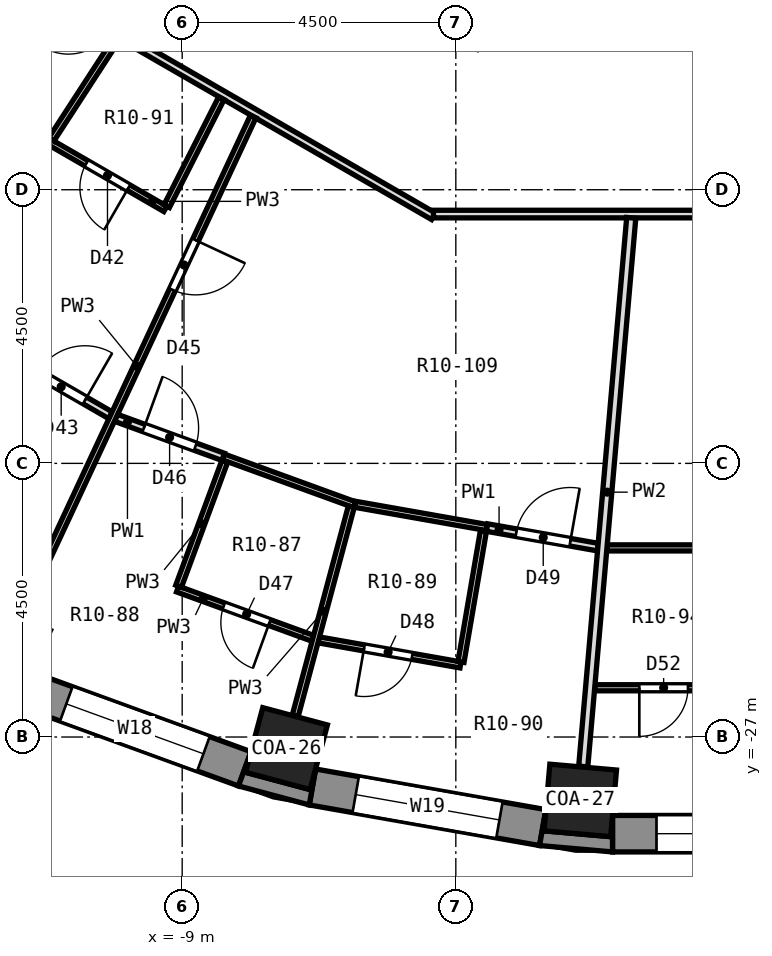
"""IFC4 building model, lengths in metres.
Left out: names, types, materials, properties, quantities, classifications, styles, units other than length and angle.
Written with IfcOpenShell. Run it as: python <this file> out.ifc"""

import sys

from ifc_helpers import new_model, si_unit, direction, frame, frame_2d, origin, origin_2d, place, context, subcontext, project, spatial, polyline, rectangle, outline, extrude, element, fill, save


model = new_model("IFC4")
c1 = context("Model", 3, precision=1e-05, world=origin(), true_north=direction((0.0, 1.0)))
c2 = subcontext(c1, "Body", "Model", "MODEL_VIEW")
j1 = project(units=[si_unit("LENGTHUNIT", "METRE"), si_unit("PLANEANGLEUNIT", "RADIAN")], contexts=[c1])
p1 = place(None, origin())
s1 = spatial("IfcSite", under=j1, at=p1, CompositionType="ELEMENT")
p2 = place(p1, origin())
s2 = spatial("IfcBuilding", under=s1, at=p2, CompositionType="ELEMENT")
p3 = place(p2, frame((0.0, 0.0, 36.2)))
s3 = spatial("IfcBuildingStorey", under=s2, at=p3, CompositionType="ELEMENT", Elevation=36.2)
for number, where, z_axis, x_axis in (
    (1, (-7.286, -27.191, 0.0), (0.0, 0.0, 1.0), (-0.259, -0.966, 0.0)),
    (2, (-2.453, -28.043, 0.0), (0.0, 0.0, 1.0), (-0.087, -0.996, 0.0)),
):
    element("IfcColumn", number, at=place(p3, frame(where, z_axis=z_axis, x_axis=x_axis)), inside=s3, PredefinedType="COLUMN", context=c2, shape_type="SweptSolid", body=[
        extrude(rectangle(XDim=1.1, YDim=1.1, at=origin_2d()), origin(), (0.0, 0.0, 1.0), 3.3),
    ])
p4 = place(p3, frame((-11.585, -26.208, 0.0), z_axis=(0.0, 0.0, 1.0), x_axis=(0.939689588564, -0.342028474173, 0.0)))
e3 = element("IfcWall", 3, at=p4, inside=s3, PredefinedType="SOLIDWALL", context=c2, shape_type="SweptSolid", body=[
    extrude(rectangle(XDim=3.846, YDim=0.6, at=frame_2d((1.923, 0.0))), origin(), (0.0, 0.0, 1.0), 2.75),
])
p5 = place(p4, frame((0.723, 0.0, 0.9)))
e4 = element("IfcOpeningElement", 4, at=p5, cuts=e3, PredefinedType="OPENING", context=c2, shape_type="SweptSolid", body=[
    extrude(rectangle(XDim=2.4, YDim=1.8, at=frame_2d((1.2, 0.9))), frame((0.0, 0.312, 0.0), z_axis=(0.0, -1.0, 0.0), x_axis=(1.0, 0.0, 0.0)), (0.0, 0.0, 1.0), 0.624),
])
p6 = place(p3, frame((-6.858, -27.821, 0.0), z_axis=(0.0, 0.0, 1.0), x_axis=(0.984800809218, -0.173687553279, 0.0)))
e5 = element("IfcWall", 5, at=p6, inside=s3, PredefinedType="SOLIDWALL", context=c2, shape_type="SweptSolid", body=[
    extrude(rectangle(XDim=3.846, YDim=0.6, at=frame_2d((1.923, 0.0))), origin(), (0.0, 0.0, 1.0), 2.75),
])
p7 = place(p6, frame((0.723, 0.0, 0.9)))
e6 = element("IfcOpeningElement", 6, at=p7, cuts=e5, PredefinedType="OPENING", context=c2, shape_type="SweptSolid", body=[
    extrude(rectangle(XDim=2.4, YDim=1.8, at=frame_2d((1.2, 0.9))), frame((0.0, 0.312, 0.0), z_axis=(0.0, -1.0, 0.0), x_axis=(1.0, 0.0, 0.0)), (0.0, 0.0, 1.0), 0.624),
])
p8 = place(p3, frame((-1.923, -28.59, 0.0), z_axis=(0.0, 0.0, 1.0), x_axis=(1.0, 0.0, 0.0)))
e7 = element("IfcWall", 7, at=p8, inside=s3, PredefinedType="SOLIDWALL", context=c2, shape_type="SweptSolid", body=[
    extrude(rectangle(XDim=3.846, YDim=0.6, at=frame_2d((1.923, 0.0))), origin(), (0.0, 0.0, 1.0), 2.75),
])
p9 = place(p8, frame((0.723, 0.0, 0.9)))
e8 = element("IfcOpeningElement", 8, at=p9, cuts=e7, PredefinedType="OPENING", context=c2, shape_type="SweptSolid", body=[
    extrude(rectangle(XDim=2.4, YDim=1.8, at=frame_2d((1.2, 0.9))), frame((0.0, 0.312, 0.0), z_axis=(0.0, -1.0, 0.0), x_axis=(1.0, 0.0, 0.0)), (0.0, 0.0, 1.0), 0.624),
])
p10 = place(p3, origin())
e9 = element("IfcWall", 9, at=p10, inside=s3, PredefinedType="SOLIDWALL", context=c2, shape_type="SweptSolid", body=[
    extrude(outline(polyline([(-6.91, -28.117), (-6.806, -27.526), (-6.897, -27.865), (-7.959, -27.58), (-7.869, -27.241), (-8.074, -27.805), (-6.91, -28.117)])), origin(), (0.0, 0.0, 1.0), 2.75),
])
p11 = place(p3, origin())
e10 = element("IfcWall", 10, at=p11, inside=s3, PredefinedType="SOLIDWALL", context=c2, shape_type="SweptSolid", body=[
    extrude(outline(polyline([(-3.123, -28.785), (-1.923, -28.89), (-1.923, -28.29), (-1.954, -28.639), (-3.049, -28.543), (-3.019, -28.194), (-3.123, -28.785)])), origin(), (0.0, 0.0, 1.0), 2.75),
])
p12 = place(p3, frame((-11.802, -20.772, 0.0), z_axis=(0.0, 0.0, 1.0), x_axis=(0.866103179807, -0.499865263774, 0.0)))
e11 = element("IfcWall", 11, at=p12, inside=s3, PredefinedType="PARTITIONING", context=c2, shape_type="SweptSolid", body=[
    extrude(rectangle(XDim=1.875, YDim=0.125, at=frame_2d((0.937, 0.0))), origin(), (0.0, 0.0, 1.0), 2.75),
])
p13 = place(p12, frame((0.487, 0.0, 0.0)))
e12 = element("IfcOpeningElement", 12, at=p13, cuts=e11, PredefinedType="OPENING", context=c2, shape_type="SweptSolid", body=[
    extrude(rectangle(XDim=0.9, YDim=2.1, at=frame_2d((0.45, 1.05))), frame((0.0, 0.074, 0.0), z_axis=(0.0, -1.0, 0.0), x_axis=(1.0, 0.0, 0.0)), (0.0, 0.0, 1.0), 0.149),
])
p14 = place(p3, frame((-11.18, -17.216, 0.0), z_axis=(0.0, 0.0, 1.0), x_axis=(0.865970937006, -0.500094327363, 0.0)))
e13 = element("IfcWall", 13, at=p14, inside=s3, PredefinedType="PARTITIONING", context=c2, shape_type="SweptSolid", body=[
    extrude(rectangle(XDim=2.197, YDim=0.1, at=frame_2d((1.099, 0.0))), origin(), (0.0, 0.0, 1.0), 2.75),
])
p15 = place(p14, frame((0.699, 0.0, 0.0)))
e14 = element("IfcOpeningElement", 14, at=p15, cuts=e13, PredefinedType="OPENING", context=c2, shape_type="SweptSolid", body=[
    extrude(rectangle(XDim=0.8, YDim=2.1, at=frame_2d((0.4, 1.05))), frame((0.0, 0.062, 0.0), z_axis=(0.0, -1.0, 0.0), x_axis=(1.0, 0.0, 0.0)), (0.0, 0.0, 1.0), 0.124),
])
p16 = place(p3, frame((-13.416, -13.501, 0.0), z_axis=(0.0, 0.0, 1.0), x_axis=(0.86605048973, -0.49995654735, 0.0)))
e15 = element("IfcWall", 15, at=p16, inside=s3, PredefinedType="PARTITIONING", context=c2, shape_type="SweptSolid", body=[
    extrude(rectangle(XDim=9.871, YDim=0.125, at=frame_2d((4.935, 0.0))), origin(), (0.0, 0.0, 1.0), 2.75),
])
p17 = place(p16, frame((2.938, 0.0, 0.0)))
e16 = element("IfcOpeningElement", 16, at=p17, cuts=e15, PredefinedType="OPENING", context=c2, shape_type="SweptSolid", body=[
    extrude(rectangle(XDim=0.8, YDim=2.1, at=frame_2d((0.4, 1.05))), frame((0.0, 0.074, 0.0), z_axis=(0.0, -1.0, 0.0), x_axis=(1.0, 0.0, 0.0)), (0.0, 0.0, 1.0), 0.149),
])
p18 = place(p3, frame((-9.076, -24.567, 0.0), z_axis=(0.0, 0.0, 1.0), x_axis=(0.939654860842, -0.342123870106, 0.0)))
e17 = element("IfcWall", 17, at=p18, inside=s3, PredefinedType="PARTITIONING", context=c2, shape_type="SweptSolid", body=[
    extrude(rectangle(XDim=2.368, YDim=0.1, at=frame_2d((1.184, 0.0))), origin(), (0.0, 0.0, 1.0), 2.75),
])
p19 = place(p18, frame((0.809, 0.0, 0.0)))
e18 = element("IfcOpeningElement", 18, at=p19, cuts=e17, PredefinedType="OPENING", context=c2, shape_type="SweptSolid", body=[
    extrude(rectangle(XDim=0.8, YDim=2.1, at=frame_2d((0.4, 1.05))), frame((0.0, 0.062, 0.0), z_axis=(0.0, -1.0, 0.0), x_axis=(1.0, 0.0, 0.0)), (0.0, 0.0, 1.0), 0.124),
])
p20 = place(p3, frame((-8.326, -22.393, 0.0), z_axis=(0.0, 0.0, 1.0), x_axis=(0.939700645731, -0.341998094165, 0.0)))
e19 = element("IfcWall", 19, at=p20, inside=s3, PredefinedType="PARTITIONING", context=c2, shape_type="SweptSolid", body=[
    extrude(rectangle(XDim=2.306, YDim=0.1, at=frame_2d((1.153, 0.0))), origin(), (0.0, 0.0, 1.0), 2.75),
])
p21 = place(p3, frame((-10.088, -21.751, 0.0), z_axis=(0.0, 0.0, 1.0), x_axis=(0.939656514106, -0.342119329325, 0.0)))
e20 = element("IfcWall", 20, at=p21, inside=s3, PredefinedType="PARTITIONING", context=c2, shape_type="SweptSolid", body=[
    extrude(rectangle(XDim=1.875, YDim=0.125, at=frame_2d((0.938, 0.0))), origin(), (0.0, 0.0, 1.0), 2.75),
])
p22 = place(p21, frame((0.488, 0.0, 0.0)))
e21 = element("IfcOpeningElement", 21, at=p22, cuts=e20, PredefinedType="OPENING", context=c2, shape_type="SweptSolid", body=[
    extrude(rectangle(XDim=0.9, YDim=2.1, at=frame_2d((0.45, 1.05))), frame((0.0, 0.074, 0.0), z_axis=(0.0, -1.0, 0.0), x_axis=(1.0, 0.0, 0.0)), (0.0, 0.0, 1.0), 0.149),
])
p23 = place(p3, frame((-6.755, -25.403, 0.0), z_axis=(0.0, 0.0, 1.0), x_axis=(0.984788748944, -0.173755920625, 0.0)))
e22 = element("IfcWall", 22, at=p23, inside=s3, PredefinedType="PARTITIONING", context=c2, shape_type="SweptSolid", body=[
    extrude(rectangle(XDim=2.368, YDim=0.1, at=frame_2d((1.184, 0.0))), origin(), (0.0, 0.0, 1.0), 2.75),
])
p24 = place(p23, frame((0.759, 0.0, 0.0)))
e23 = element("IfcOpeningElement", 23, at=p24, cuts=e22, PredefinedType="OPENING", context=c2, shape_type="SweptSolid", body=[
    extrude(rectangle(XDim=0.8, YDim=2.1, at=frame_2d((0.4, 1.05))), frame((0.0, 0.062, 0.0), z_axis=(0.0, -1.0, 0.0), x_axis=(1.0, 0.0, 0.0)), (0.0, 0.0, 1.0), 0.124),
])
p25 = place(p3, frame((-6.158, -23.173, 0.0), z_axis=(0.0, 0.0, 1.0), x_axis=(0.984800270927, -0.173690605338, 0.0)))
e24 = element("IfcWall", 24, at=p25, inside=s3, PredefinedType="PARTITIONING", context=c2, shape_type="SweptSolid", body=[
    extrude(rectangle(XDim=2.205, YDim=0.1, at=frame_2d((1.103, 0.0))), origin(), (0.0, 0.0, 1.0), 2.75),
])
p26 = place(p3, frame((-3.986, -23.556, 0.0), z_axis=(0.0, 0.0, 1.0), x_axis=(0.984806134001, -0.173657359285, 0.0)))
e25 = element("IfcWall", 25, at=p26, inside=s3, PredefinedType="PARTITIONING", context=c2, shape_type="SweptSolid", body=[
    extrude(rectangle(XDim=1.85, YDim=0.125, at=frame_2d((0.925, 0.0))), origin(), (0.0, 0.0, 1.0), 2.75),
])
p27 = place(p26, frame((0.488, 0.0, 0.0)))
e26 = element("IfcOpeningElement", 26, at=p27, cuts=e25, PredefinedType="OPENING", context=c2, shape_type="SweptSolid", body=[
    extrude(rectangle(XDim=0.9, YDim=2.1, at=frame_2d((0.45, 1.05))), frame((0.0, 0.074, 0.0), z_axis=(0.0, -1.0, 0.0), x_axis=(1.0, 0.0, 0.0)), (0.0, 0.0, 1.0), 0.149),
])
p28 = place(p3, frame((-2.216, -26.19, 0.0), z_axis=(0.0, 0.0, 1.0), x_axis=(1.0, 0.0, 0.0)))
e27 = element("IfcWall", 27, at=p28, inside=s3, PredefinedType="PARTITIONING", context=c2, shape_type="SweptSolid", body=[
    extrude(rectangle(XDim=2.292, YDim=0.1, at=frame_2d((1.146, 0.0))), origin(), (0.0, 0.0, 1.0), 2.75),
])
p29 = place(p28, frame((0.733, 0.0, 0.0)))
e28 = element("IfcOpeningElement", 28, at=p29, cuts=e27, PredefinedType="OPENING", context=c2, shape_type="SweptSolid", body=[
    extrude(rectangle(XDim=0.8, YDim=2.1, at=frame_2d((0.4, 1.05))), frame((0.0, 0.062, 0.0), z_axis=(0.0, -1.0, 0.0), x_axis=(1.0, 0.0, 0.0)), (0.0, 0.0, 1.0), 0.124),
])
p30 = place(p3, frame((-2.015, -23.89, 0.0), z_axis=(0.0, 0.0, 1.0), x_axis=(1.0, 0.0, 0.0)))
e29 = element("IfcWall", 29, at=p30, inside=s3, PredefinedType="PARTITIONING", context=c2, shape_type="SweptSolid", body=[
    extrude(rectangle(XDim=2.08, YDim=0.1, at=frame_2d((1.04, 0.0))), origin(), (0.0, 0.0, 1.0), 2.75),
])
p31 = place(p3, frame((-4.867, -18.4, 0.0), z_axis=(0.0, 0.0, 1.0), x_axis=(1.0, 0.0, 0.0)))
e30 = element("IfcWall", 30, at=p31, inside=s3, PredefinedType="PARTITIONING", context=c2, shape_type="SweptSolid", body=[
    extrude(rectangle(XDim=9.87, YDim=0.125, at=frame_2d((4.935, 0.0))), origin(), (0.0, 0.0, 1.0), 2.75),
])
p32 = place(p31, frame((6.028, 0.0, 0.0)))
e31 = element("IfcOpeningElement", 31, at=p32, cuts=e30, PredefinedType="OPENING", context=c2, shape_type="SweptSolid", body=[
    extrude(rectangle(XDim=1.0, YDim=2.1, at=frame_2d((0.5, 1.05))), frame((0.0, 0.074, 0.0), z_axis=(0.0, -1.0, 0.0), x_axis=(1.0, 0.0, 0.0)), (0.0, 0.0, 1.0), 0.149),
])
p33 = place(p3, frame((-14.207, -19.199, 0.0), z_axis=(0.0, 0.0, 1.0), x_axis=(0.595318943931, 0.80348948655, 0.0)))
e32 = element("IfcWall", 32, at=p33, inside=s3, PredefinedType="PARTITIONING", context=c2, shape_type="SweptSolid", body=[
    extrude(rectangle(XDim=5.302, YDim=0.1, at=frame_2d((2.651, 0.0))), origin(), (0.0, 0.0, 1.0), 2.75),
])
p34 = place(p33, frame((2.207, 0.0, 0.0)))
e33 = element("IfcOpeningElement", 33, at=p34, cuts=e32, PredefinedType="OPENING", context=c2, shape_type="SweptSolid", body=[
    extrude(rectangle(XDim=0.9, YDim=2.1, at=frame_2d((0.45, 1.05))), frame((0.0, 0.062, 0.0), z_axis=(0.0, -1.0, 0.0), x_axis=(1.0, 0.0, 0.0)), (0.0, 0.0, 1.0), 0.124),
])
p35 = place(p3, frame((-11.153, -17.174, 0.0), z_axis=(0.0, 0.0, 1.0), x_axis=(0.544664848093, 0.838653804172, 0.0)))
e34 = element("IfcWall", 34, at=p35, inside=s3, PredefinedType="PARTITIONING", context=c2, shape_type="SweptSolid", body=[
    extrude(rectangle(XDim=1.99, YDim=0.1, at=frame_2d((0.995, 0.0))), origin(), (0.0, 0.0, 1.0), 2.75),
])
p36 = place(p3, frame((-9.254, -18.271, 0.0), z_axis=(0.0, 0.0, 1.0), x_axis=(0.451770869898, 0.89213400401, 0.0)))
e35 = element("IfcWall", 35, at=p36, inside=s3, PredefinedType="PARTITIONING", context=c2, shape_type="SweptSolid", body=[
    extrude(rectangle(XDim=1.99, YDim=0.1, at=frame_2d((0.995, 0.0))), origin(), (0.0, 0.0, 1.0), 2.75),
])
p37 = place(p3, frame((-11.66, -25.005, 0.0), z_axis=(0.0, 0.0, 1.0), x_axis=(0.422646386434, 0.906294671745, 0.0)))
e36 = element("IfcWall", 36, at=p37, inside=s3, PredefinedType="PARTITIONING", context=c2, shape_type="SweptSolid", body=[
    extrude(rectangle(XDim=9.057, YDim=0.1, at=frame_2d((4.528, 0.0))), origin(), (0.0, 0.0, 1.0), 2.75),
])
p38 = place(p37, frame((5.914, 0.0, 0.0)))
e37 = element("IfcOpeningElement", 37, at=p38, cuts=e36, PredefinedType="OPENING", context=c2, shape_type="SweptSolid", body=[
    extrude(rectangle(XDim=0.9, YDim=2.1, at=frame_2d((0.45, 1.05))), frame((0.0, 0.062, 0.0), z_axis=(0.0, -1.0, 0.0), x_axis=(1.0, 0.0, 0.0)), (0.0, 0.0, 1.0), 0.124),
])
p39 = place(p3, frame((-9.059, -24.52, 0.0), z_axis=(0.0, 0.0, 1.0), x_axis=(0.346507080222, 0.93804735667, 0.0)))
e38 = element("IfcWall", 38, at=p39, inside=s3, PredefinedType="PARTITIONING", context=c2, shape_type="SweptSolid", body=[
    extrude(rectangle(XDim=2.187, YDim=0.1, at=frame_2d((1.094, 0.0))), origin(), (0.0, 0.0, 1.0), 2.75),
])
p40 = place(p3, frame((-7.141, -26.65, 0.0), z_axis=(0.0, 0.0, 1.0), x_axis=(0.259045837699, 0.965865028858, 0.0)))
e39 = element("IfcWall", 39, at=p40, inside=s3, PredefinedType="PARTITIONING", context=c2, shape_type="SweptSolid", body=[
    extrude(rectangle(XDim=3.559, YDim=0.1, at=frame_2d((1.779, 0.0))), origin(), (0.0, 0.0, 1.0), 2.75),
])
p41 = place(p3, frame((-4.415, -25.765, 0.0), z_axis=(0.0, 0.0, 1.0), x_axis=(0.168650911642, 0.985675844283, 0.0)))
e40 = element("IfcWall", 40, at=p41, inside=s3, PredefinedType="PARTITIONING", context=c2, shape_type="SweptSolid", body=[
    extrude(rectangle(XDim=2.187, YDim=0.1, at=frame_2d((1.094, 0.0))), origin(), (0.0, 0.0, 1.0), 2.75),
])
p42 = place(p3, frame((-2.405, -27.485, 0.0), z_axis=(0.0, 0.0, 1.0), x_axis=(0.087173972326, 0.996193103042, 0.0)))
e41 = element("IfcWall", 41, at=p42, inside=s3, PredefinedType="PARTITIONING", context=c2, shape_type="SweptSolid", body=[
    extrude(rectangle(XDim=9.057, YDim=0.15, at=frame_2d((4.529, 0.0))), origin(), (0.0, 0.0, 1.0), 2.75),
])
p43 = place(p5, origin())
e42 = element("IfcWindow", 42, at=p43, inside=s3, PartitioningType="SINGLE_PANEL", PredefinedType="WINDOW", context=c2, shape_type="SweptSolid", body=[
    extrude(rectangle(XDim=2.4, YDim=1.8, at=frame_2d((1.2, 0.9))), frame((0.0, 0.18, 0.0), z_axis=(0.0, -1.0, 0.0), x_axis=(1.0, 0.0, 0.0)), (0.0, 0.0, 1.0), 0.06),
])
fill(e4, e42)
p44 = place(p7, origin())
e43 = element("IfcWindow", 43, at=p44, inside=s3, PartitioningType="SINGLE_PANEL", PredefinedType="WINDOW", context=c2, shape_type="SweptSolid", body=[
    extrude(rectangle(XDim=2.4, YDim=1.8, at=frame_2d((1.2, 0.9))), frame((0.0, 0.18, 0.0), z_axis=(0.0, -1.0, 0.0), x_axis=(1.0, 0.0, 0.0)), (0.0, 0.0, 1.0), 0.06),
])
fill(e6, e43)
p45 = place(p9, origin())
e44 = element("IfcWindow", 44, at=p45, inside=s3, PartitioningType="SINGLE_PANEL", PredefinedType="WINDOW", context=c2, shape_type="SweptSolid", body=[
    extrude(rectangle(XDim=2.4, YDim=1.8, at=frame_2d((1.2, 0.9))), frame((0.0, 0.18, 0.0), z_axis=(0.0, -1.0, 0.0), x_axis=(1.0, 0.0, 0.0)), (0.0, 0.0, 1.0), 0.06),
])
fill(e8, e44)
p46 = place(p15, frame((0.8, 0.0, 0.0), z_axis=(0.0, 0.0, 1.0), x_axis=(-1.0, 0.0, 0.0)))
e45 = element("IfcDoor", 45, at=p46, inside=s3, OperationType="SINGLE_SWING_LEFT", PredefinedType="DOOR", context=c2, shape_type="SweptSolid", body=[
    extrude(rectangle(XDim=0.8, YDim=2.1, at=frame_2d((0.4, 1.05))), frame((0.0, 0.025, 0.0), z_axis=(0.0, -1.0, 0.0), x_axis=(1.0, 0.0, 0.0)), (0.0, 0.0, 1.0), 0.05),
])
fill(e14, e45)
p47 = place(p13, origin())
e46 = element("IfcDoor", 46, at=p47, inside=s3, OperationType="SINGLE_SWING_RIGHT", PredefinedType="DOOR", context=c2, shape_type="SweptSolid", body=[
    extrude(rectangle(XDim=0.9, YDim=2.1, at=frame_2d((0.45, 1.05))), frame((0.0, 0.025, 0.0), z_axis=(0.0, -1.0, 0.0), x_axis=(1.0, 0.0, 0.0)), (0.0, 0.0, 1.0), 0.05),
])
fill(e12, e46)
p48 = place(p38, frame((0.9, 0.0, 0.0), z_axis=(0.0, 0.0, 1.0), x_axis=(-1.0, 0.0, 0.0)))
e47 = element("IfcDoor", 47, at=p48, inside=s3, OperationType="SINGLE_SWING_LEFT", PredefinedType="DOOR", context=c2, shape_type="SweptSolid", body=[
    extrude(rectangle(XDim=0.9, YDim=2.1, at=frame_2d((0.45, 1.05))), frame((0.0, 0.025, 0.0), z_axis=(0.0, -1.0, 0.0), x_axis=(1.0, 0.0, 0.0)), (0.0, 0.0, 1.0), 0.05),
])
fill(e37, e47)
p49 = place(p22, origin())
e48 = element("IfcDoor", 48, at=p49, inside=s3, OperationType="SINGLE_SWING_LEFT", PredefinedType="DOOR", context=c2, shape_type="SweptSolid", body=[
    extrude(rectangle(XDim=0.9, YDim=2.1, at=frame_2d((0.45, 1.05))), frame((0.0, 0.025, 0.0), z_axis=(0.0, -1.0, 0.0), x_axis=(1.0, 0.0, 0.0)), (0.0, 0.0, 1.0), 0.05),
])
fill(e21, e48)
p50 = place(p19, frame((0.8, 0.0, 0.0), z_axis=(0.0, 0.0, 1.0), x_axis=(-1.0, 0.0, 0.0)))
e49 = element("IfcDoor", 49, at=p50, inside=s3, OperationType="SINGLE_SWING_LEFT", PredefinedType="DOOR", context=c2, shape_type="SweptSolid", body=[
    extrude(rectangle(XDim=0.8, YDim=2.1, at=frame_2d((0.4, 1.05))), frame((0.0, 0.025, 0.0), z_axis=(0.0, -1.0, 0.0), x_axis=(1.0, 0.0, 0.0)), (0.0, 0.0, 1.0), 0.05),
])
fill(e18, e49)
p51 = place(p24, frame((0.8, 0.0, 0.0), z_axis=(0.0, 0.0, 1.0), x_axis=(-1.0, 0.0, 0.0)))
e50 = element("IfcDoor", 50, at=p51, inside=s3, OperationType="SINGLE_SWING_RIGHT", PredefinedType="DOOR", context=c2, shape_type="SweptSolid", body=[
    extrude(rectangle(XDim=0.8, YDim=2.1, at=frame_2d((0.4, 1.05))), frame((0.0, 0.025, 0.0), z_axis=(0.0, -1.0, 0.0), x_axis=(1.0, 0.0, 0.0)), (0.0, 0.0, 1.0), 0.05),
])
fill(e23, e50)
p52 = place(p27, origin())
e51 = element("IfcDoor", 51, at=p52, inside=s3, OperationType="SINGLE_SWING_RIGHT", PredefinedType="DOOR", context=c2, shape_type="SweptSolid", body=[
    extrude(rectangle(XDim=0.9, YDim=2.1, at=frame_2d((0.45, 1.05))), frame((0.0, 0.025, 0.0), z_axis=(0.0, -1.0, 0.0), x_axis=(1.0, 0.0, 0.0)), (0.0, 0.0, 1.0), 0.05),
])
fill(e26, e51)
p53 = place(p29, frame((0.8, 0.0, 0.0), z_axis=(0.0, 0.0, 1.0), x_axis=(-1.0, 0.0, 0.0)))
e52 = element("IfcDoor", 52, at=p53, inside=s3, OperationType="SINGLE_SWING_RIGHT", PredefinedType="DOOR", context=c2, shape_type="SweptSolid", body=[
    extrude(rectangle(XDim=0.8, YDim=2.1, at=frame_2d((0.4, 1.05))), frame((0.0, 0.025, 0.0), z_axis=(0.0, -1.0, 0.0), x_axis=(1.0, 0.0, 0.0)), (0.0, 0.0, 1.0), 0.05),
])
fill(e28, e52)
save(model, sys.argv[1])
